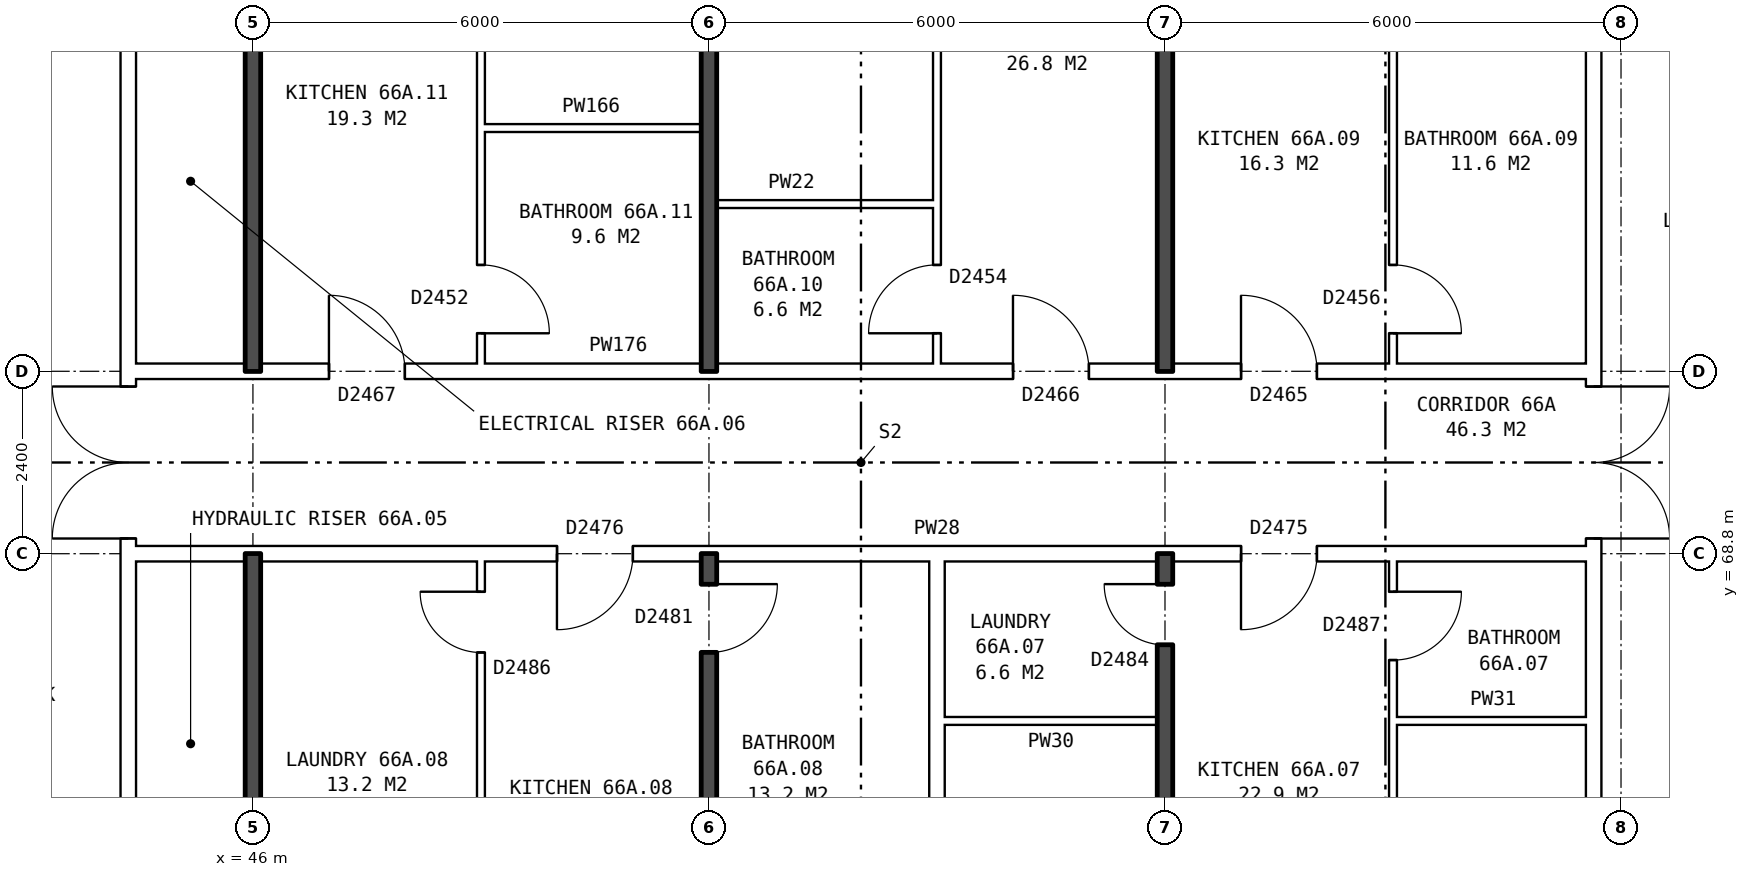
"""IFC4 building model, lengths in metres.
Left out: names, types, materials, properties, quantities, classifications, styles, units other than length and angle.
Written with IfcOpenShell. Run it as: python <this file> out.ifc"""

import sys

from ifc_helpers import new_model, si_unit, direction, frame, frame_2d, origin, place, context, subcontext, project, spatial, rectangle, extrude, element, fill, save


model = new_model("IFC4")
c1 = context("Model", 3, precision=1e-05, world=origin(), true_north=direction((0.0, 1.0)))
c2 = subcontext(c1, "Body", "Model", "MODEL_VIEW")
j1 = project(units=[si_unit("LENGTHUNIT", "METRE"), si_unit("PLANEANGLEUNIT", "RADIAN")], contexts=[c1])
p1 = place(None, origin())
s1 = spatial("IfcSite", under=j1, at=p1, CompositionType="ELEMENT")
p2 = place(p1, origin())
s2 = spatial("IfcBuilding", under=s1, at=p2, CompositionType="ELEMENT")
p3 = place(p2, frame((0.0, 0.0, 233.8)))
s3 = spatial("IfcBuildingStorey", under=s2, at=p3, CompositionType="ELEMENT", Elevation=233.8)
p4 = place(p3, frame((63.64, 63.9, 0.0), z_axis=(0.0, 0.0, 1.0), x_axis=(0.0, 1.0, 0.0)))
e1 = element("IfcWall", 1, at=p4, inside=s3, PredefinedType="PARTITIONING", context=c2, shape_type="SweptSolid", body=[
    extrude(rectangle(XDim=12.2, YDim=0.2, at=frame_2d((6.1, 0.0))), origin(), (0.0, 0.0, 1.0), 2.85),
])
p5 = place(p4, frame((5.1, 0.0, 0.0)))
e2 = element("IfcOpeningElement", 2, at=p5, cuts=e1, PredefinedType="OPENING", context=c2, shape_type="SweptSolid", body=[
    extrude(rectangle(XDim=2.0, YDim=2.1, at=frame_2d((1.0, 1.05))), frame((0.0, 0.11, 0.0), z_axis=(0.0, -1.0, 0.0), x_axis=(1.0, 0.0, 0.0)), (0.0, 0.0, 1.0), 0.22),
])
p6 = place(p3, frame((44.36, 63.9, 0.0), z_axis=(0.0, 0.0, 1.0), x_axis=(0.0, 1.0, 0.0)))
e3 = element("IfcWall", 3, at=p6, inside=s3, PredefinedType="PARTITIONING", context=c2, shape_type="SweptSolid", body=[
    extrude(rectangle(XDim=12.2, YDim=0.2, at=frame_2d((6.1, 0.0))), origin(), (0.0, 0.0, 1.0), 2.85),
])
p7 = place(p6, frame((5.1, 0.0, 0.0)))
e4 = element("IfcOpeningElement", 4, at=p7, cuts=e3, PredefinedType="OPENING", context=c2, shape_type="SweptSolid", body=[
    extrude(rectangle(XDim=2.0, YDim=2.1, at=frame_2d((1.0, 1.05))), frame((0.0, 0.11, 0.0), z_axis=(0.0, -1.0, 0.0), x_axis=(1.0, 0.0, 0.0)), (0.0, 0.0, 1.0), 0.22),
])
p8 = place(p3, frame((55.1, 66.6, 0.0), z_axis=(0.0, 0.0, 1.0), x_axis=(1.0, 0.0, 0.0)))
e5 = element("IfcWall", 5, at=p8, inside=s3, PredefinedType="PARTITIONING", context=c2, shape_type="SweptSolid", body=[
    extrude(rectangle(XDim=2.8, YDim=0.1, at=frame_2d((1.4, 0.0))), origin(), (0.0, 0.0, 1.0), 2.85),
])
p9 = place(p3, frame((61.0, 66.6, 0.0), z_axis=(0.0, 0.0, 1.0), x_axis=(1.0, 0.0, 0.0)))
e6 = element("IfcWall", 6, at=p9, inside=s3, PredefinedType="PARTITIONING", context=c2, shape_type="SweptSolid", body=[
    extrude(rectangle(XDim=2.64, YDim=0.1, at=frame_2d((1.32, 0.0))), origin(), (0.0, 0.0, 1.0), 2.85),
])
p10 = place(p3, frame((44.36, 68.8, 0.0), z_axis=(0.0, 0.0, 1.0), x_axis=(1.0, 0.0, 0.0)))
e7 = element("IfcWall", 7, at=p10, inside=s3, PredefinedType="PARTITIONING", context=c2, shape_type="SweptSolid", body=[
    extrude(rectangle(XDim=19.28, YDim=0.2, at=frame_2d((9.64, 0.0))), origin(), (0.0, 0.0, 1.0), 2.85),
])
p11 = place(p10, frame((14.64, 0.0, 0.0)))
e8 = element("IfcOpeningElement", 8, at=p11, cuts=e7, PredefinedType="OPENING", context=c2, shape_type="SweptSolid", body=[
    extrude(rectangle(XDim=1.0, YDim=2.1, at=frame_2d((0.5, 1.05))), frame((0.0, 0.11, 0.0), z_axis=(0.0, -1.0, 0.0), x_axis=(1.0, 0.0, 0.0)), (0.0, 0.0, 1.0), 0.22),
])
p12 = place(p10, frame((5.64, 0.0, 0.0)))
e9 = element("IfcOpeningElement", 9, at=p12, cuts=e7, PredefinedType="OPENING", context=c2, shape_type="SweptSolid", body=[
    extrude(rectangle(XDim=1.0, YDim=2.1, at=frame_2d((0.5, 1.05))), frame((0.0, 0.11, 0.0), z_axis=(0.0, -1.0, 0.0), x_axis=(1.0, 0.0, 0.0)), (0.0, 0.0, 1.0), 0.22),
])
p13 = place(p3, frame((44.36, 71.2, 0.0), z_axis=(0.0, 0.0, 1.0), x_axis=(1.0, 0.0, 0.0)))
e10 = element("IfcWall", 10, at=p13, inside=s3, PredefinedType="PARTITIONING", context=c2, shape_type="SweptSolid", body=[
    extrude(rectangle(XDim=19.28, YDim=0.2, at=frame_2d((9.64, 0.0))), origin(), (0.0, 0.0, 1.0), 2.85),
])
p14 = place(p13, frame((14.64, 0.0, 0.0)))
e11 = element("IfcOpeningElement", 11, at=p14, cuts=e10, PredefinedType="OPENING", context=c2, shape_type="SweptSolid", body=[
    extrude(rectangle(XDim=1.0, YDim=2.1, at=frame_2d((0.5, 1.05))), frame((0.0, 0.11, 0.0), z_axis=(0.0, -1.0, 0.0), x_axis=(1.0, 0.0, 0.0)), (0.0, 0.0, 1.0), 0.22),
])
p15 = place(p13, frame((11.64, 0.0, 0.0)))
e12 = element("IfcOpeningElement", 12, at=p15, cuts=e10, PredefinedType="OPENING", context=c2, shape_type="SweptSolid", body=[
    extrude(rectangle(XDim=1.0, YDim=2.1, at=frame_2d((0.5, 1.05))), frame((0.0, 0.11, 0.0), z_axis=(0.0, -1.0, 0.0), x_axis=(1.0, 0.0, 0.0)), (0.0, 0.0, 1.0), 0.22),
])
p16 = place(p13, frame((2.64, 0.0, 0.0)))
e13 = element("IfcOpeningElement", 13, at=p16, cuts=e10, PredefinedType="OPENING", context=c2, shape_type="SweptSolid", body=[
    extrude(rectangle(XDim=1.0, YDim=2.1, at=frame_2d((0.5, 1.05))), frame((0.0, 0.11, 0.0), z_axis=(0.0, -1.0, 0.0), x_axis=(1.0, 0.0, 0.0)), (0.0, 0.0, 1.0), 0.22),
])
for number, where, z_axis, x_axis in (
    (14, (52.1, 73.4, 0.0), (0.0, 0.0, 1.0), (1.0, 0.0, 0.0)),
    (15, (49.0, 74.4, 0.0), (0.0, 0.0, 1.0), (1.0, 0.0, 0.0)),
):
    element("IfcWall", number, at=place(p3, frame(where, z_axis=z_axis, x_axis=x_axis)), inside=s3, PredefinedType="PARTITIONING", context=c2, shape_type="SweptSolid", body=[
        extrude(rectangle(XDim=2.9, YDim=0.1, at=frame_2d((1.45, 0.0))), origin(), (0.0, 0.0, 1.0), 2.85),
    ])
for number, where, z_axis, x_axis in (
    (16, (46.0, 54.36, 0.0), (0.0, 0.0, 1.0), (0.0, 1.0, 0.0)),
    (17, (46.0, 71.2, 0.0), (0.0, 0.0, 1.0), (0.0, 1.0, 0.0)),
):
    element("IfcWall", number, at=place(p3, frame(where, z_axis=z_axis, x_axis=x_axis)), inside=s3, PredefinedType="SOLIDWALL", context=c2, shape_type="SweptSolid", body=[
        extrude(rectangle(XDim=14.44, YDim=0.2, at=frame_2d((7.22, 0.0))), origin(), (0.0, 0.0, 1.0), 2.85),
    ])
p17 = place(p3, frame((49.0, 54.36, 0.0), z_axis=(0.0, 0.0, 1.0), x_axis=(0.0, 1.0, 0.0)))
e18 = element("IfcWall", 18, at=p17, inside=s3, PredefinedType="PARTITIONING", context=c2, shape_type="SweptSolid", body=[
    extrude(rectangle(XDim=14.34, YDim=0.1, at=frame_2d((7.17, 0.0))), origin(), (0.0, 0.0, 1.0), 2.85),
])
p18 = place(p17, frame((4.2, 0.0, 0.0)))
e19 = element("IfcOpeningElement", 19, at=p18, cuts=e18, PredefinedType="OPENING", context=c2, shape_type="SweptSolid", body=[
    extrude(rectangle(XDim=0.9, YDim=2.1, at=frame_2d((0.45, 1.05))), frame((0.0, 0.06, 0.0), z_axis=(0.0, -1.0, 0.0), x_axis=(1.0, 0.0, 0.0)), (0.0, 0.0, 1.0), 0.12),
])
p19 = place(p17, frame((13.14, 0.0, 0.0)))
e20 = element("IfcOpeningElement", 20, at=p19, cuts=e18, PredefinedType="OPENING", context=c2, shape_type="SweptSolid", body=[
    extrude(rectangle(XDim=0.8, YDim=2.1, at=frame_2d((0.4, 1.05))), frame((0.0, 0.06, 0.0), z_axis=(0.0, -1.0, 0.0), x_axis=(1.0, 0.0, 0.0)), (0.0, 0.0, 1.0), 0.12),
])
p20 = place(p3, frame((49.0, 71.3, 0.0), z_axis=(0.0, 0.0, 1.0), x_axis=(0.0, 1.0, 0.0)))
e21 = element("IfcWall", 21, at=p20, inside=s3, PredefinedType="PARTITIONING", context=c2, shape_type="SweptSolid", body=[
    extrude(rectangle(XDim=14.34, YDim=0.1, at=frame_2d((7.17, 0.0))), origin(), (0.0, 0.0, 1.0), 2.85),
])
p21 = place(p20, frame((6.74, 0.0, 0.0)))
e22 = element("IfcOpeningElement", 22, at=p21, cuts=e21, PredefinedType="OPENING", context=c2, shape_type="SweptSolid", body=[
    extrude(rectangle(XDim=0.9, YDim=2.1, at=frame_2d((0.45, 1.05))), frame((0.0, 0.06, 0.0), z_axis=(0.0, -1.0, 0.0), x_axis=(1.0, 0.0, 0.0)), (0.0, 0.0, 1.0), 0.12),
])
p22 = place(p20, frame((0.4, 0.0, 0.0)))
e23 = element("IfcOpeningElement", 23, at=p22, cuts=e21, PredefinedType="OPENING", context=c2, shape_type="SweptSolid", body=[
    extrude(rectangle(XDim=0.9, YDim=2.1, at=frame_2d((0.45, 1.05))), frame((0.0, 0.06, 0.0), z_axis=(0.0, -1.0, 0.0), x_axis=(1.0, 0.0, 0.0)), (0.0, 0.0, 1.0), 0.12),
])
p23 = place(p3, frame((52.0, 54.36, 0.0), z_axis=(0.0, 0.0, 1.0), x_axis=(0.0, 1.0, 0.0)))
e24 = element("IfcWall", 24, at=p23, inside=s3, PredefinedType="SOLIDWALL", context=c2, shape_type="SweptSolid", body=[
    extrude(rectangle(XDim=14.44, YDim=0.2, at=frame_2d((7.22, 0.0))), origin(), (0.0, 0.0, 1.0), 2.85),
])
p24 = place(p23, frame((4.2, 0.0, 0.0)))
e25 = element("IfcOpeningElement", 25, at=p24, cuts=e24, PredefinedType="OPENING", context=c2, shape_type="SweptSolid", body=[
    extrude(rectangle(XDim=0.9, YDim=2.1, at=frame_2d((0.45, 1.05))), frame((0.0, 0.11, 0.0), z_axis=(0.0, -1.0, 0.0), x_axis=(1.0, 0.0, 0.0)), (0.0, 0.0, 1.0), 0.22),
])
p25 = place(p23, frame((13.14, 0.0, 0.0)))
e26 = element("IfcOpeningElement", 26, at=p25, cuts=e24, PredefinedType="OPENING", context=c2, shape_type="SweptSolid", body=[
    extrude(rectangle(XDim=0.9, YDim=2.1, at=frame_2d((0.45, 1.05))), frame((0.0, 0.11, 0.0), z_axis=(0.0, -1.0, 0.0), x_axis=(1.0, 0.0, 0.0)), (0.0, 0.0, 1.0), 0.22),
])
p26 = place(p3, frame((52.0, 71.2, 0.0), z_axis=(0.0, 0.0, 1.0), x_axis=(0.0, 1.0, 0.0)))
e27 = element("IfcWall", 27, at=p26, inside=s3, PredefinedType="SOLIDWALL", context=c2, shape_type="SweptSolid", body=[
    extrude(rectangle(XDim=14.44, YDim=0.2, at=frame_2d((7.22, 0.0))), origin(), (0.0, 0.0, 1.0), 2.85),
])
p27 = place(p3, frame((55.0, 54.36, 0.0), z_axis=(0.0, 0.0, 1.0), x_axis=(0.0, 1.0, 0.0)))
e28 = element("IfcWall", 28, at=p27, inside=s3, PredefinedType="PARTITIONING", context=c2, shape_type="SweptSolid", body=[
    extrude(rectangle(XDim=14.34, YDim=0.2, at=frame_2d((7.17, 0.0))), origin(), (0.0, 0.0, 1.0), 2.85),
])
p28 = place(p3, frame((55.0, 71.3, 0.0), z_axis=(0.0, 0.0, 1.0), x_axis=(0.0, 1.0, 0.0)))
e29 = element("IfcWall", 29, at=p28, inside=s3, PredefinedType="PARTITIONING", context=c2, shape_type="SweptSolid", body=[
    extrude(rectangle(XDim=14.34, YDim=0.1, at=frame_2d((7.17, 0.0))), origin(), (0.0, 0.0, 1.0), 2.85),
])
p29 = place(p28, frame((9.24, 0.0, 0.0)))
e30 = element("IfcOpeningElement", 30, at=p29, cuts=e29, PredefinedType="OPENING", context=c2, shape_type="SweptSolid", body=[
    extrude(rectangle(XDim=0.9, YDim=2.1, at=frame_2d((0.45, 1.05))), frame((0.0, 0.06, 0.0), z_axis=(0.0, -1.0, 0.0), x_axis=(1.0, 0.0, 0.0)), (0.0, 0.0, 1.0), 0.12),
])
p30 = place(p28, frame((0.4, 0.0, 0.0)))
e31 = element("IfcOpeningElement", 31, at=p30, cuts=e29, PredefinedType="OPENING", context=c2, shape_type="SweptSolid", body=[
    extrude(rectangle(XDim=0.9, YDim=2.1, at=frame_2d((0.45, 1.05))), frame((0.0, 0.06, 0.0), z_axis=(0.0, -1.0, 0.0), x_axis=(1.0, 0.0, 0.0)), (0.0, 0.0, 1.0), 0.12),
])
p31 = place(p3, frame((58.0, 54.36, 0.0), z_axis=(0.0, 0.0, 1.0), x_axis=(0.0, 1.0, 0.0)))
e32 = element("IfcWall", 32, at=p31, inside=s3, PredefinedType="SOLIDWALL", context=c2, shape_type="SweptSolid", body=[
    extrude(rectangle(XDim=14.44, YDim=0.2, at=frame_2d((7.22, 0.0))), origin(), (0.0, 0.0, 1.0), 2.85),
])
p32 = place(p31, frame((5.5, 0.0, 0.0)))
e33 = element("IfcOpeningElement", 33, at=p32, cuts=e32, PredefinedType="OPENING", context=c2, shape_type="SweptSolid", body=[
    extrude(rectangle(XDim=0.9, YDim=2.1, at=frame_2d((0.45, 1.05))), frame((0.0, 0.11, 0.0), z_axis=(0.0, -1.0, 0.0), x_axis=(1.0, 0.0, 0.0)), (0.0, 0.0, 1.0), 0.22),
])
p33 = place(p31, frame((13.24, 0.0, 0.0)))
e34 = element("IfcOpeningElement", 34, at=p33, cuts=e32, PredefinedType="OPENING", context=c2, shape_type="SweptSolid", body=[
    extrude(rectangle(XDim=0.8, YDim=2.1, at=frame_2d((0.4, 1.05))), frame((0.0, 0.11, 0.0), z_axis=(0.0, -1.0, 0.0), x_axis=(1.0, 0.0, 0.0)), (0.0, 0.0, 1.0), 0.22),
])
p34 = place(p3, frame((58.0, 71.2, 0.0), z_axis=(0.0, 0.0, 1.0), x_axis=(0.0, 1.0, 0.0)))
e35 = element("IfcWall", 35, at=p34, inside=s3, PredefinedType="SOLIDWALL", context=c2, shape_type="SweptSolid", body=[
    extrude(rectangle(XDim=14.44, YDim=0.2, at=frame_2d((7.22, 0.0))), origin(), (0.0, 0.0, 1.0), 2.85),
])
p35 = place(p3, frame((61.0, 54.36, 0.0), z_axis=(0.0, 0.0, 1.0), x_axis=(0.0, 1.0, 0.0)))
e36 = element("IfcWall", 36, at=p35, inside=s3, PredefinedType="PARTITIONING", context=c2, shape_type="SweptSolid", body=[
    extrude(rectangle(XDim=14.34, YDim=0.1, at=frame_2d((7.17, 0.0))), origin(), (0.0, 0.0, 1.0), 2.85),
])
p36 = place(p35, frame((5.5, 0.0, 0.0)))
e37 = element("IfcOpeningElement", 37, at=p36, cuts=e36, PredefinedType="OPENING", context=c2, shape_type="SweptSolid", body=[
    extrude(rectangle(XDim=0.9, YDim=2.1, at=frame_2d((0.45, 1.05))), frame((0.0, 0.06, 0.0), z_axis=(0.0, -1.0, 0.0), x_axis=(1.0, 0.0, 0.0)), (0.0, 0.0, 1.0), 0.12),
])
p37 = place(p35, frame((13.04, 0.0, 0.0)))
e38 = element("IfcOpeningElement", 38, at=p37, cuts=e36, PredefinedType="OPENING", context=c2, shape_type="SweptSolid", body=[
    extrude(rectangle(XDim=0.9, YDim=2.1, at=frame_2d((0.45, 1.05))), frame((0.0, 0.06, 0.0), z_axis=(0.0, -1.0, 0.0), x_axis=(1.0, 0.0, 0.0)), (0.0, 0.0, 1.0), 0.12),
])
p38 = place(p3, frame((61.0, 71.3, 0.0), z_axis=(0.0, 0.0, 1.0), x_axis=(0.0, 1.0, 0.0)))
e39 = element("IfcWall", 39, at=p38, inside=s3, PredefinedType="PARTITIONING", context=c2, shape_type="SweptSolid", body=[
    extrude(rectangle(XDim=14.34, YDim=0.1, at=frame_2d((7.17, 0.0))), origin(), (0.0, 0.0, 1.0), 2.85),
])
p39 = place(p38, frame((5.74, 0.0, 0.0)))
e40 = element("IfcOpeningElement", 40, at=p39, cuts=e39, PredefinedType="OPENING", context=c2, shape_type="SweptSolid", body=[
    extrude(rectangle(XDim=0.9, YDim=2.1, at=frame_2d((0.45, 1.05))), frame((0.0, 0.06, 0.0), z_axis=(0.0, -1.0, 0.0), x_axis=(1.0, 0.0, 0.0)), (0.0, 0.0, 1.0), 0.12),
])
p40 = place(p38, frame((0.4, 0.0, 0.0)))
e41 = element("IfcOpeningElement", 41, at=p40, cuts=e39, PredefinedType="OPENING", context=c2, shape_type="SweptSolid", body=[
    extrude(rectangle(XDim=0.9, YDim=2.1, at=frame_2d((0.45, 1.05))), frame((0.0, 0.06, 0.0), z_axis=(0.0, -1.0, 0.0), x_axis=(1.0, 0.0, 0.0)), (0.0, 0.0, 1.0), 0.12),
])
p41 = place(p5, frame((2.0, 0.0, 0.0), z_axis=(0.0, 0.0, 1.0), x_axis=(-1.0, 0.0, 0.0)))
e42 = element("IfcDoor", 42, at=p41, inside=s3, OperationType="DOUBLE_DOOR_SINGLE_SWING", PredefinedType="DOOR", context=c2, shape_type="SweptSolid", body=[
    extrude(rectangle(XDim=2.0, YDim=2.1, at=frame_2d((1.0, 1.05))), frame((0.0, 0.025, 0.0), z_axis=(0.0, -1.0, 0.0), x_axis=(1.0, 0.0, 0.0)), (0.0, 0.0, 1.0), 0.05),
])
fill(e2, e42)
p42 = place(p7, origin())
e43 = element("IfcDoor", 43, at=p42, inside=s3, OperationType="DOUBLE_DOOR_SINGLE_SWING", PredefinedType="DOOR", context=c2, shape_type="SweptSolid", body=[
    extrude(rectangle(XDim=2.0, YDim=2.1, at=frame_2d((1.0, 1.05))), frame((0.0, 0.025, 0.0), z_axis=(0.0, -1.0, 0.0), x_axis=(1.0, 0.0, 0.0)), (0.0, 0.0, 1.0), 0.05),
])
fill(e4, e43)
p43 = place(p11, frame((1.0, 0.0, 0.0), z_axis=(0.0, 0.0, 1.0), x_axis=(-1.0, 0.0, 0.0)))
e44 = element("IfcDoor", 44, at=p43, inside=s3, OperationType="SINGLE_SWING_RIGHT", PredefinedType="DOOR", context=c2, shape_type="SweptSolid", body=[
    extrude(rectangle(XDim=1.0, YDim=2.1, at=frame_2d((0.5, 1.05))), frame((0.0, 0.025, 0.0), z_axis=(0.0, -1.0, 0.0), x_axis=(1.0, 0.0, 0.0)), (0.0, 0.0, 1.0), 0.05),
])
fill(e8, e44)
p44 = place(p37, frame((0.9, 0.0, 0.0), z_axis=(0.0, 0.0, 1.0), x_axis=(-1.0, 0.0, 0.0)))
e45 = element("IfcDoor", 45, at=p44, inside=s3, OperationType="SINGLE_SWING_LEFT", PredefinedType="DOOR", context=c2, shape_type="SweptSolid", body=[
    extrude(rectangle(XDim=0.9, YDim=2.1, at=frame_2d((0.45, 1.05))), frame((0.0, 0.025, 0.0), z_axis=(0.0, -1.0, 0.0), x_axis=(1.0, 0.0, 0.0)), (0.0, 0.0, 1.0), 0.05),
])
fill(e38, e45)
p45 = place(p33, origin())
e46 = element("IfcDoor", 46, at=p45, inside=s3, OperationType="SINGLE_SWING_RIGHT", PredefinedType="DOOR", context=c2, shape_type="SweptSolid", body=[
    extrude(rectangle(XDim=0.8, YDim=2.1, at=frame_2d((0.4, 1.05))), frame((0.0, 0.025, 0.0), z_axis=(0.0, -1.0, 0.0), x_axis=(1.0, 0.0, 0.0)), (0.0, 0.0, 1.0), 0.05),
])
fill(e34, e46)
p46 = place(p12, frame((1.0, 0.0, 0.0), z_axis=(0.0, 0.0, 1.0), x_axis=(-1.0, 0.0, 0.0)))
e47 = element("IfcDoor", 47, at=p46, inside=s3, OperationType="SINGLE_SWING_RIGHT", PredefinedType="DOOR", context=c2, shape_type="SweptSolid", body=[
    extrude(rectangle(XDim=1.0, YDim=2.1, at=frame_2d((0.5, 1.05))), frame((0.0, 0.025, 0.0), z_axis=(0.0, -1.0, 0.0), x_axis=(1.0, 0.0, 0.0)), (0.0, 0.0, 1.0), 0.05),
])
fill(e9, e47)
p47 = place(p25, frame((0.9, 0.0, 0.0), z_axis=(0.0, 0.0, 1.0), x_axis=(-1.0, 0.0, 0.0)))
e48 = element("IfcDoor", 48, at=p47, inside=s3, OperationType="SINGLE_SWING_LEFT", PredefinedType="DOOR", context=c2, shape_type="SweptSolid", body=[
    extrude(rectangle(XDim=0.9, YDim=2.1, at=frame_2d((0.45, 1.05))), frame((0.0, 0.025, 0.0), z_axis=(0.0, -1.0, 0.0), x_axis=(1.0, 0.0, 0.0)), (0.0, 0.0, 1.0), 0.05),
])
fill(e26, e48)
p48 = place(p19, origin())
e49 = element("IfcDoor", 49, at=p48, inside=s3, OperationType="SINGLE_SWING_RIGHT", PredefinedType="DOOR", context=c2, shape_type="SweptSolid", body=[
    extrude(rectangle(XDim=0.8, YDim=2.1, at=frame_2d((0.4, 1.05))), frame((0.0, 0.025, 0.0), z_axis=(0.0, -1.0, 0.0), x_axis=(1.0, 0.0, 0.0)), (0.0, 0.0, 1.0), 0.05),
])
fill(e20, e49)
p49 = place(p14, origin())
e50 = element("IfcDoor", 50, at=p49, inside=s3, OperationType="SINGLE_SWING_LEFT", PredefinedType="DOOR", context=c2, shape_type="SweptSolid", body=[
    extrude(rectangle(XDim=1.0, YDim=2.1, at=frame_2d((0.5, 1.05))), frame((0.0, 0.025, 0.0), z_axis=(0.0, -1.0, 0.0), x_axis=(1.0, 0.0, 0.0)), (0.0, 0.0, 1.0), 0.05),
])
fill(e11, e50)
p50 = place(p40, frame((0.9, 0.0, 0.0), z_axis=(0.0, 0.0, 1.0), x_axis=(-1.0, 0.0, 0.0)))
e51 = element("IfcDoor", 51, at=p50, inside=s3, OperationType="SINGLE_SWING_RIGHT", PredefinedType="DOOR", context=c2, shape_type="SweptSolid", body=[
    extrude(rectangle(XDim=0.9, YDim=2.1, at=frame_2d((0.45, 1.05))), frame((0.0, 0.025, 0.0), z_axis=(0.0, -1.0, 0.0), x_axis=(1.0, 0.0, 0.0)), (0.0, 0.0, 1.0), 0.05),
])
fill(e41, e51)
p51 = place(p15, origin())
e52 = element("IfcDoor", 52, at=p51, inside=s3, OperationType="SINGLE_SWING_LEFT", PredefinedType="DOOR", context=c2, shape_type="SweptSolid", body=[
    extrude(rectangle(XDim=1.0, YDim=2.1, at=frame_2d((0.5, 1.05))), frame((0.0, 0.025, 0.0), z_axis=(0.0, -1.0, 0.0), x_axis=(1.0, 0.0, 0.0)), (0.0, 0.0, 1.0), 0.05),
])
fill(e12, e52)
p52 = place(p30, origin())
e53 = element("IfcDoor", 53, at=p52, inside=s3, OperationType="SINGLE_SWING_LEFT", PredefinedType="DOOR", context=c2, shape_type="SweptSolid", body=[
    extrude(rectangle(XDim=0.9, YDim=2.1, at=frame_2d((0.45, 1.05))), frame((0.0, 0.025, 0.0), z_axis=(0.0, -1.0, 0.0), x_axis=(1.0, 0.0, 0.0)), (0.0, 0.0, 1.0), 0.05),
])
fill(e31, e53)
p53 = place(p16, origin())
e54 = element("IfcDoor", 54, at=p53, inside=s3, OperationType="SINGLE_SWING_LEFT", PredefinedType="DOOR", context=c2, shape_type="SweptSolid", body=[
    extrude(rectangle(XDim=1.0, YDim=2.1, at=frame_2d((0.5, 1.05))), frame((0.0, 0.025, 0.0), z_axis=(0.0, -1.0, 0.0), x_axis=(1.0, 0.0, 0.0)), (0.0, 0.0, 1.0), 0.05),
])
fill(e13, e54)
p54 = place(p22, frame((0.9, 0.0, 0.0), z_axis=(0.0, 0.0, 1.0), x_axis=(-1.0, 0.0, 0.0)))
e55 = element("IfcDoor", 55, at=p54, inside=s3, OperationType="SINGLE_SWING_RIGHT", PredefinedType="DOOR", context=c2, shape_type="SweptSolid", body=[
    extrude(rectangle(XDim=0.9, YDim=2.1, at=frame_2d((0.45, 1.05))), frame((0.0, 0.025, 0.0), z_axis=(0.0, -1.0, 0.0), x_axis=(1.0, 0.0, 0.0)), (0.0, 0.0, 1.0), 0.05),
])
fill(e23, e55)
save(model, sys.argv[1])
